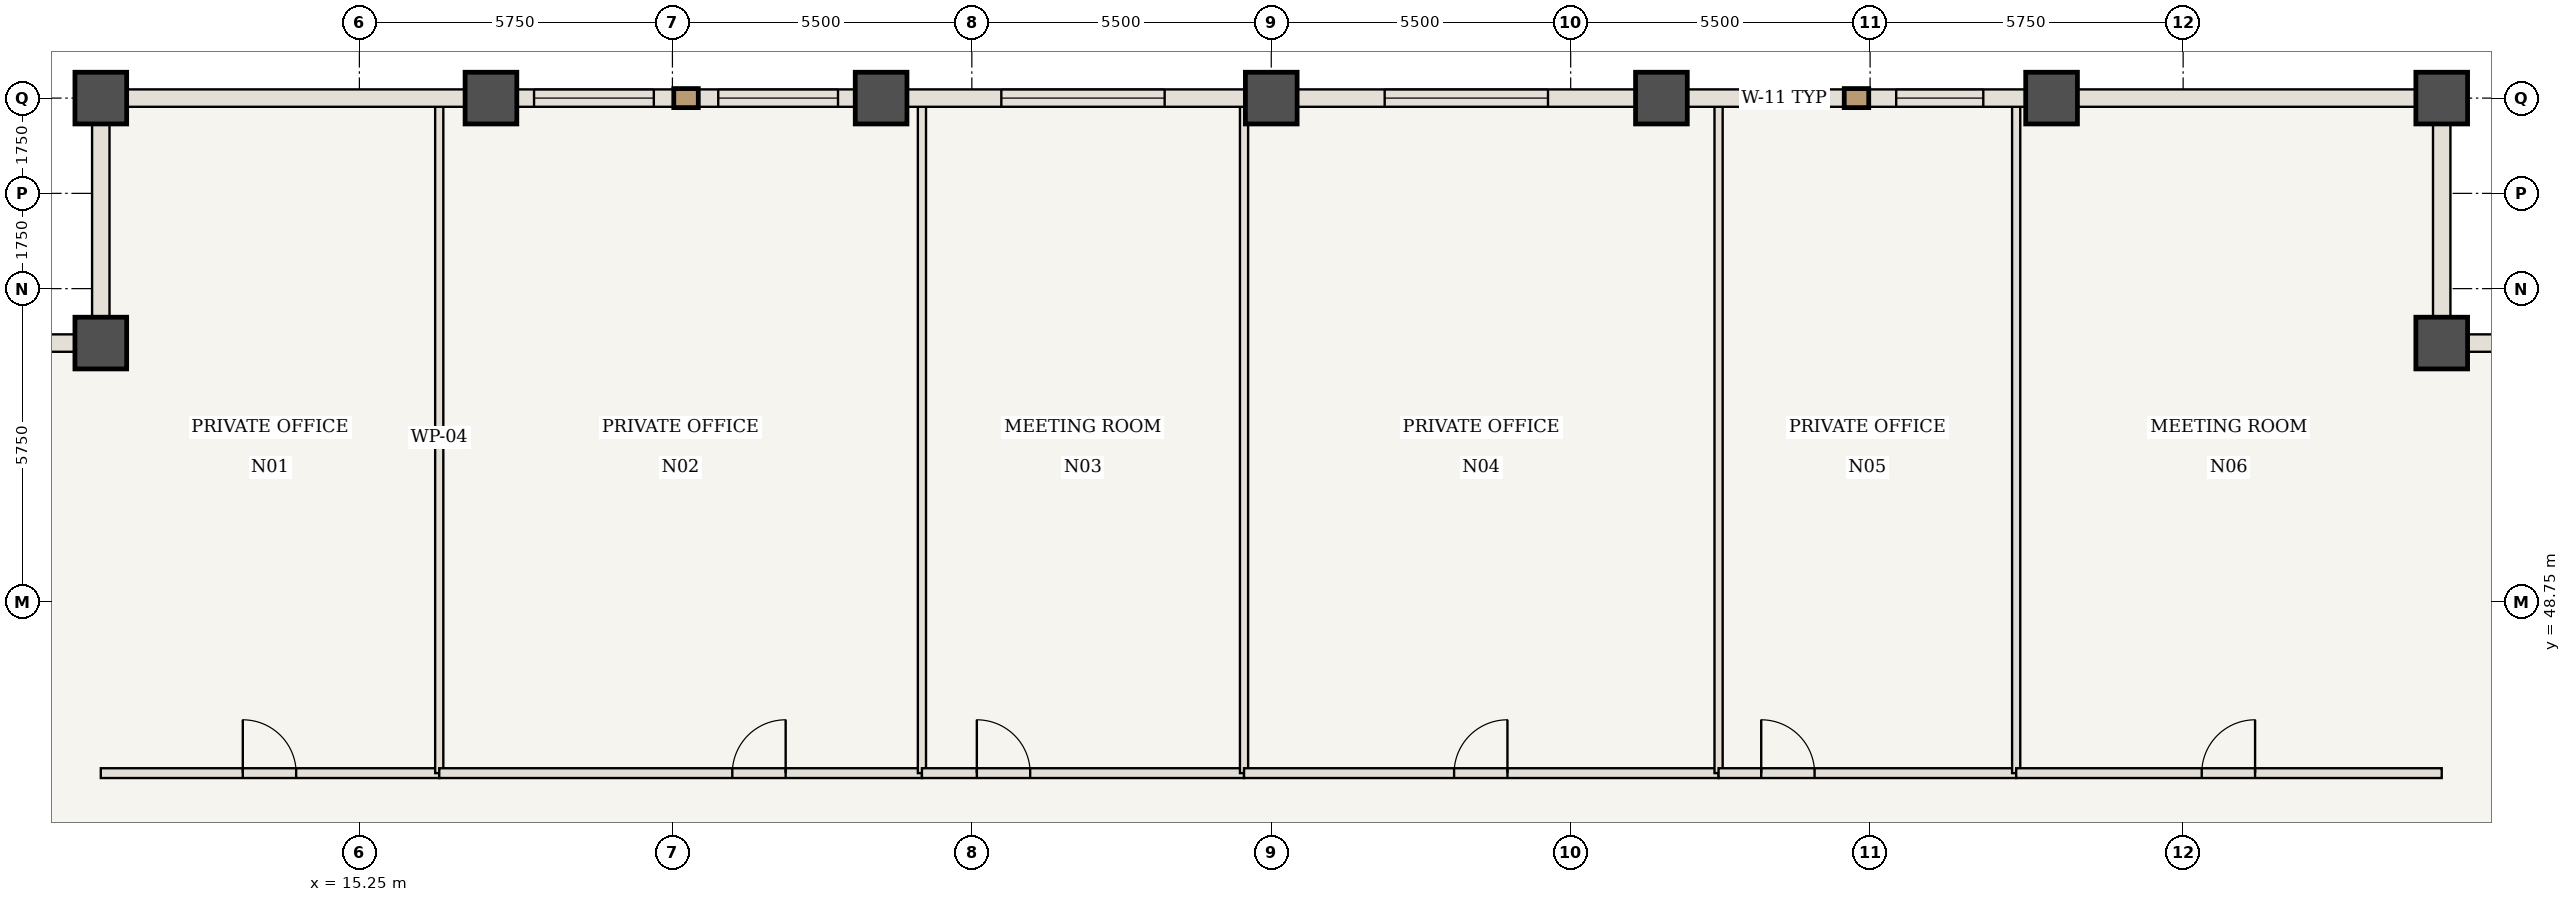
"""IFC4 building model, lengths in metres.
Left out: names, types, materials, properties, quantities, classifications, styles, units other than length and angle.
Written with IfcOpenShell. Run it as: python <this file> out.ifc"""

import sys

from ifc_helpers import new_model, si_unit, direction, frame, frame_2d, origin, origin_2d, place, context, subcontext, project, spatial, rectangle, extrude, element, fill, save


model = new_model("IFC4")
c1 = context("Model", 3, precision=1e-05, world=origin(), true_north=direction((0.0, 1.0)))
c2 = subcontext(c1, "Body", "Model", "MODEL_VIEW")
j1 = project(units=[si_unit("LENGTHUNIT", "METRE"), si_unit("PLANEANGLEUNIT", "RADIAN")], contexts=[c1])
p1 = place(None, origin())
s1 = spatial("IfcSite", under=j1, at=p1, CompositionType="ELEMENT")
p2 = place(p1, origin())
s2 = spatial("IfcBuilding", under=s1, at=p2, CompositionType="ELEMENT")
p3 = place(p2, frame((0.0, 0.0, 110.6)))
s3 = spatial("IfcBuildingStorey", under=s2, at=p3, CompositionType="ELEMENT", Elevation=110.6)
for number, where, z_axis, x_axis in (
    (1, (53.5, 53.5, 0.0), (0.0, 0.0, 1.0), (1.0, 0.0, 0.0)),
    (2, (53.5, 58.0, 0.0), (0.0, 0.0, 1.0), (1.0, 0.0, 0.0)),
    (3, (10.5, 58.0, 0.0), (0.0, 0.0, 1.0), (1.0, 0.0, 0.0)),
    (4, (10.5, 53.5, 0.0), (0.0, 0.0, 1.0), (1.0, 0.0, 0.0)),
    (5, (17.667, 58.0, 0.0), (0.0, 0.0, 1.0), (1.0, 0.0, 0.0)),
    (6, (24.833, 58.0, 0.0), (0.0, 0.0, 1.0), (1.0, 0.0, 0.0)),
    (7, (32.0, 58.0, 0.0), (0.0, 0.0, 1.0), (1.0, 0.0, 0.0)),
    (8, (39.167, 58.0, 0.0), (0.0, 0.0, 1.0), (1.0, 0.0, 0.0)),
    (9, (46.333, 58.0, 0.0), (0.0, 0.0, 1.0), (1.0, 0.0, 0.0)),
):
    element("IfcColumn", number, at=place(p3, frame(where, z_axis=z_axis, x_axis=x_axis)), inside=s3, PredefinedType="COLUMN", context=c2, shape_type="SweptSolid", body=[
        extrude(rectangle(XDim=0.95, YDim=0.95, at=origin_2d()), origin(), (0.0, 0.0, 1.0), 3.85),
    ])
p4 = place(p3, frame((10.5, 45.6, 0.0), z_axis=(0.0, 0.0, 1.0), x_axis=(1.0, 0.0, 0.0)))
e10 = element("IfcWall", 10, at=p4, inside=s3, PredefinedType="STANDARD", context=c2, shape_type="SweptSolid", body=[
    extrude(rectangle(XDim=6.217, YDim=0.18, at=frame_2d((3.108, 0.0))), origin(), (0.0, 0.0, 1.0), 3.43),
])
p5 = place(p4, frame((2.608, 0.0, 0.0)))
e11 = element("IfcOpeningElement", 11, at=p5, cuts=e10, PredefinedType="OPENING", context=c2, shape_type="SweptSolid", body=[
    extrude(rectangle(XDim=0.98, YDim=2.2, at=frame_2d((0.49, 1.1))), frame((0.0, 0.1, 0.0), z_axis=(0.0, -1.0, 0.0), x_axis=(1.0, 0.0, 0.0)), (0.0, 0.0, 1.0), 0.2),
])
p6 = place(p3, frame((16.717, 45.6, 0.0), z_axis=(0.0, 0.0, 1.0), x_axis=(0.0, 1.0, 0.0)))
e12 = element("IfcWall", 12, at=p6, inside=s3, PredefinedType="STANDARD", context=c2, shape_type="SweptSolid", body=[
    extrude(rectangle(XDim=12.34, YDim=0.15, at=frame_2d((6.17, 0.0))), origin(), (0.0, 0.0, 1.0), 3.43),
])
p7 = place(p3, frame((16.717, 45.6, 0.0), z_axis=(0.0, 0.0, 1.0), x_axis=(1.0, 0.0, 0.0)))
e13 = element("IfcWall", 13, at=p7, inside=s3, PredefinedType="STANDARD", context=c2, shape_type="SweptSolid", body=[
    extrude(rectangle(XDim=8.866, YDim=0.18, at=frame_2d((4.433, 0.0))), origin(), (0.0, 0.0, 1.0), 3.43),
])
p8 = place(p7, frame((5.383, 0.0, 0.0)))
e14 = element("IfcOpeningElement", 14, at=p8, cuts=e13, PredefinedType="OPENING", context=c2, shape_type="SweptSolid", body=[
    extrude(rectangle(XDim=0.98, YDim=2.2, at=frame_2d((0.49, 1.1))), frame((0.0, 0.1, 0.0), z_axis=(0.0, -1.0, 0.0), x_axis=(1.0, 0.0, 0.0)), (0.0, 0.0, 1.0), 0.2),
])
p9 = place(p3, frame((25.583, 45.6, 0.0), z_axis=(0.0, 0.0, 1.0), x_axis=(0.0, 1.0, 0.0)))
e15 = element("IfcWall", 15, at=p9, inside=s3, PredefinedType="STANDARD", context=c2, shape_type="SweptSolid", body=[
    extrude(rectangle(XDim=12.34, YDim=0.15, at=frame_2d((6.17, 0.0))), origin(), (0.0, 0.0, 1.0), 3.43),
])
p10 = place(p3, frame((25.583, 45.6, 0.0), z_axis=(0.0, 0.0, 1.0), x_axis=(1.0, 0.0, 0.0)))
e16 = element("IfcWall", 16, at=p10, inside=s3, PredefinedType="STANDARD", context=c2, shape_type="SweptSolid", body=[
    extrude(rectangle(XDim=5.917, YDim=0.18, at=frame_2d((2.958, 0.0))), origin(), (0.0, 0.0, 1.0), 3.43),
])
p11 = place(p10, frame((1.008, 0.0, 0.0)))
e17 = element("IfcOpeningElement", 17, at=p11, cuts=e16, PredefinedType="OPENING", context=c2, shape_type="SweptSolid", body=[
    extrude(rectangle(XDim=0.98, YDim=2.2, at=frame_2d((0.49, 1.1))), frame((0.0, 0.1, 0.0), z_axis=(0.0, -1.0, 0.0), x_axis=(1.0, 0.0, 0.0)), (0.0, 0.0, 1.0), 0.2),
])
p12 = place(p3, frame((31.5, 45.6, 0.0), z_axis=(0.0, 0.0, 1.0), x_axis=(0.0, 1.0, 0.0)))
e18 = element("IfcWall", 18, at=p12, inside=s3, PredefinedType="STANDARD", context=c2, shape_type="SweptSolid", body=[
    extrude(rectangle(XDim=12.34, YDim=0.15, at=frame_2d((6.17, 0.0))), origin(), (0.0, 0.0, 1.0), 3.43),
])
p13 = place(p3, frame((31.5, 45.6, 0.0), z_axis=(0.0, 0.0, 1.0), x_axis=(1.0, 0.0, 0.0)))
e19 = element("IfcWall", 19, at=p13, inside=s3, PredefinedType="STANDARD", context=c2, shape_type="SweptSolid", body=[
    extrude(rectangle(XDim=8.717, YDim=0.18, at=frame_2d((4.358, 0.0))), origin(), (0.0, 0.0, 1.0), 3.43),
])
p14 = place(p13, frame((3.858, 0.0, 0.0)))
e20 = element("IfcOpeningElement", 20, at=p14, cuts=e19, PredefinedType="OPENING", context=c2, shape_type="SweptSolid", body=[
    extrude(rectangle(XDim=0.98, YDim=2.2, at=frame_2d((0.49, 1.1))), frame((0.0, 0.1, 0.0), z_axis=(0.0, -1.0, 0.0), x_axis=(1.0, 0.0, 0.0)), (0.0, 0.0, 1.0), 0.2),
])
p15 = place(p3, frame((40.217, 45.6, 0.0), z_axis=(0.0, 0.0, 1.0), x_axis=(0.0, 1.0, 0.0)))
e21 = element("IfcWall", 21, at=p15, inside=s3, PredefinedType="STANDARD", context=c2, shape_type="SweptSolid", body=[
    extrude(rectangle(XDim=12.34, YDim=0.15, at=frame_2d((6.17, 0.0))), origin(), (0.0, 0.0, 1.0), 3.43),
])
p16 = place(p3, frame((40.217, 45.6, 0.0), z_axis=(0.0, 0.0, 1.0), x_axis=(1.0, 0.0, 0.0)))
e22 = element("IfcWall", 22, at=p16, inside=s3, PredefinedType="STANDARD", context=c2, shape_type="SweptSolid", body=[
    extrude(rectangle(XDim=5.467, YDim=0.18, at=frame_2d((2.733, 0.0))), origin(), (0.0, 0.0, 1.0), 3.43),
])
p17 = place(p16, frame((0.783, 0.0, 0.0)))
e23 = element("IfcOpeningElement", 23, at=p17, cuts=e22, PredefinedType="OPENING", context=c2, shape_type="SweptSolid", body=[
    extrude(rectangle(XDim=0.98, YDim=2.2, at=frame_2d((0.49, 1.1))), frame((0.0, 0.1, 0.0), z_axis=(0.0, -1.0, 0.0), x_axis=(1.0, 0.0, 0.0)), (0.0, 0.0, 1.0), 0.2),
])
p18 = place(p3, frame((45.683, 45.6, 0.0), z_axis=(0.0, 0.0, 1.0), x_axis=(0.0, 1.0, 0.0)))
e24 = element("IfcWall", 24, at=p18, inside=s3, PredefinedType="STANDARD", context=c2, shape_type="SweptSolid", body=[
    extrude(rectangle(XDim=12.34, YDim=0.15, at=frame_2d((6.17, 0.0))), origin(), (0.0, 0.0, 1.0), 3.43),
])
p19 = place(p3, frame((45.683, 45.6, 0.0), z_axis=(0.0, 0.0, 1.0), x_axis=(1.0, 0.0, 0.0)))
e25 = element("IfcWall", 25, at=p19, inside=s3, PredefinedType="STANDARD", context=c2, shape_type="SweptSolid", body=[
    extrude(rectangle(XDim=7.817, YDim=0.18, at=frame_2d((3.908, 0.0))), origin(), (0.0, 0.0, 1.0), 3.43),
])
p20 = place(p19, frame((3.408, 0.0, 0.0)))
e26 = element("IfcOpeningElement", 26, at=p20, cuts=e25, PredefinedType="OPENING", context=c2, shape_type="SweptSolid", body=[
    extrude(rectangle(XDim=0.98, YDim=2.2, at=frame_2d((0.49, 1.1))), frame((0.0, 0.1, 0.0), z_axis=(0.0, -1.0, 0.0), x_axis=(1.0, 0.0, 0.0)), (0.0, 0.0, 1.0), 0.2),
])
p21 = place(p3, frame((10.5, 58.0, 0.0), z_axis=(0.0, 0.0, 1.0), x_axis=(1.0, 0.0, 0.0)))
e27 = element("IfcWall", 27, at=p21, inside=s3, PredefinedType="USERDEFINED", context=c2, shape_type="SweptSolid", body=[
    extrude(rectangle(XDim=7.167, YDim=0.32, at=frame_2d((3.583, 0.0))), origin(), (0.0, 0.0, 1.0), 2.63),
])
p22 = place(p3, frame((17.667, 58.0, 0.0), z_axis=(0.0, 0.0, 1.0), x_axis=(1.0, 0.0, 0.0)))
e28 = element("IfcWall", 28, at=p22, inside=s3, PredefinedType="USERDEFINED", context=c2, shape_type="SweptSolid", body=[
    extrude(rectangle(XDim=7.167, YDim=0.32, at=frame_2d((3.583, 0.0))), origin(), (0.0, 0.0, 1.0), 2.63),
])
p23 = place(p22, frame((0.792, 0.0, 0.85)))
e29 = element("IfcOpeningElement", 29, at=p23, cuts=e28, PredefinedType="OPENING", context=c2, shape_type="SweptSolid", body=[
    extrude(rectangle(XDim=2.2, YDim=1.58, at=frame_2d((1.1, 0.79))), frame((0.0, 0.17, 0.0), z_axis=(0.0, -1.0, 0.0), x_axis=(1.0, 0.0, 0.0)), (0.0, 0.0, 1.0), 0.34),
])
p24 = place(p22, frame((4.175, 0.0, 0.85)))
e30 = element("IfcOpeningElement", 30, at=p24, cuts=e28, PredefinedType="OPENING", context=c2, shape_type="SweptSolid", body=[
    extrude(rectangle(XDim=2.2, YDim=1.58, at=frame_2d((1.1, 0.79))), frame((0.0, 0.17, 0.0), z_axis=(0.0, -1.0, 0.0), x_axis=(1.0, 0.0, 0.0)), (0.0, 0.0, 1.0), 0.34),
])
p25 = place(p3, frame((24.833, 58.0, 0.0), z_axis=(0.0, 0.0, 1.0), x_axis=(1.0, 0.0, 0.0)))
e31 = element("IfcWall", 31, at=p25, inside=s3, PredefinedType="USERDEFINED", context=c2, shape_type="SweptSolid", body=[
    extrude(rectangle(XDim=7.167, YDim=0.32, at=frame_2d((3.583, 0.0))), origin(), (0.0, 0.0, 1.0), 2.63),
])
p26 = place(p25, frame((2.208, 0.0, 0.85)))
e32 = element("IfcOpeningElement", 32, at=p26, cuts=e31, PredefinedType="OPENING", context=c2, shape_type="SweptSolid", body=[
    extrude(rectangle(XDim=3.0, YDim=1.58, at=frame_2d((1.5, 0.79))), frame((0.0, 0.17, 0.0), z_axis=(0.0, -1.0, 0.0), x_axis=(1.0, 0.0, 0.0)), (0.0, 0.0, 1.0), 0.34),
])
p27 = place(p3, frame((32.0, 58.0, 0.0), z_axis=(0.0, 0.0, 1.0), x_axis=(1.0, 0.0, 0.0)))
e33 = element("IfcWall", 33, at=p27, inside=s3, PredefinedType="USERDEFINED", context=c2, shape_type="SweptSolid", body=[
    extrude(rectangle(XDim=7.167, YDim=0.32, at=frame_2d((3.583, 0.0))), origin(), (0.0, 0.0, 1.0), 2.63),
])
p28 = place(p27, frame((2.083, 0.0, 0.85)))
e34 = element("IfcOpeningElement", 34, at=p28, cuts=e33, PredefinedType="OPENING", context=c2, shape_type="SweptSolid", body=[
    extrude(rectangle(XDim=3.0, YDim=1.58, at=frame_2d((1.5, 0.79))), frame((0.0, 0.17, 0.0), z_axis=(0.0, -1.0, 0.0), x_axis=(1.0, 0.0, 0.0)), (0.0, 0.0, 1.0), 0.34),
])
p29 = place(p3, frame((39.167, 58.0, 0.0), z_axis=(0.0, 0.0, 1.0), x_axis=(1.0, 0.0, 0.0)))
e35 = element("IfcWall", 35, at=p29, inside=s3, PredefinedType="USERDEFINED", context=c2, shape_type="SweptSolid", body=[
    extrude(rectangle(XDim=7.167, YDim=0.32, at=frame_2d((3.583, 0.0))), origin(), (0.0, 0.0, 1.0), 2.63),
])
p30 = place(p29, frame((1.454, 0.0, 0.85)))
e36 = element("IfcOpeningElement", 36, at=p30, cuts=e35, PredefinedType="OPENING", context=c2, shape_type="SweptSolid", body=[
    extrude(rectangle(XDim=1.6, YDim=1.58, at=frame_2d((0.8, 0.79))), frame((0.0, 0.17, 0.0), z_axis=(0.0, -1.0, 0.0), x_axis=(1.0, 0.0, 0.0)), (0.0, 0.0, 1.0), 0.34),
])
p31 = place(p29, frame((4.312, 0.0, 0.85)))
e37 = element("IfcOpeningElement", 37, at=p31, cuts=e35, PredefinedType="OPENING", context=c2, shape_type="SweptSolid", body=[
    extrude(rectangle(XDim=1.6, YDim=1.58, at=frame_2d((0.8, 0.79))), frame((0.0, 0.17, 0.0), z_axis=(0.0, -1.0, 0.0), x_axis=(1.0, 0.0, 0.0)), (0.0, 0.0, 1.0), 0.34),
])
p32 = place(p3, frame((46.333, 58.0, 0.0), z_axis=(0.0, 0.0, 1.0), x_axis=(1.0, 0.0, 0.0)))
e38 = element("IfcWall", 38, at=p32, inside=s3, PredefinedType="USERDEFINED", context=c2, shape_type="SweptSolid", body=[
    extrude(rectangle(XDim=7.167, YDim=0.32, at=frame_2d((3.583, 0.0))), origin(), (0.0, 0.0, 1.0), 2.63),
])
for number, where, z_axis, x_axis in (
    (39, (53.5, 53.5, 0.0), (0.0, 0.0, 1.0), (1.0, 0.0, 0.0)),
    (40, (53.5, 58.0, 0.0), (0.0, 0.0, 1.0), (0.0, -1.0, 0.0)),
    (41, (10.5, 53.5, 0.0), (0.0, 0.0, 1.0), (0.0, 1.0, 0.0)),
    (42, (6.0, 53.5, 0.0), (0.0, 0.0, 1.0), (1.0, 0.0, 0.0)),
):
    element("IfcWall", number, at=place(p3, frame(where, z_axis=z_axis, x_axis=x_axis)), inside=s3, PredefinedType="USERDEFINED", context=c2, shape_type="SweptSolid", body=[
        extrude(rectangle(XDim=4.5, YDim=0.32, at=frame_2d((2.25, 0.0))), origin(), (0.0, 0.0, 1.0), 2.63),
    ])
p33 = place(p5, origin())
e43 = element("IfcDoor", 43, at=p33, inside=s3, OperationType="SINGLE_SWING_LEFT", PredefinedType="DOOR", context=c2, shape_type="SweptSolid", body=[
    extrude(rectangle(XDim=0.98, YDim=2.2, at=frame_2d((0.49, 1.1))), frame((0.0, 0.025, 0.0), z_axis=(0.0, -1.0, 0.0), x_axis=(1.0, 0.0, 0.0)), (0.0, 0.0, 1.0), 0.05),
])
fill(e11, e43)
p34 = place(p8, origin())
e44 = element("IfcDoor", 44, at=p34, inside=s3, OperationType="SINGLE_SWING_RIGHT", PredefinedType="DOOR", context=c2, shape_type="SweptSolid", body=[
    extrude(rectangle(XDim=0.98, YDim=2.2, at=frame_2d((0.49, 1.1))), frame((0.0, 0.025, 0.0), z_axis=(0.0, -1.0, 0.0), x_axis=(1.0, 0.0, 0.0)), (0.0, 0.0, 1.0), 0.05),
])
fill(e14, e44)
p35 = place(p11, origin())
e45 = element("IfcDoor", 45, at=p35, inside=s3, OperationType="SINGLE_SWING_LEFT", PredefinedType="DOOR", context=c2, shape_type="SweptSolid", body=[
    extrude(rectangle(XDim=0.98, YDim=2.2, at=frame_2d((0.49, 1.1))), frame((0.0, 0.025, 0.0), z_axis=(0.0, -1.0, 0.0), x_axis=(1.0, 0.0, 0.0)), (0.0, 0.0, 1.0), 0.05),
])
fill(e17, e45)
p36 = place(p14, origin())
e46 = element("IfcDoor", 46, at=p36, inside=s3, OperationType="SINGLE_SWING_RIGHT", PredefinedType="DOOR", context=c2, shape_type="SweptSolid", body=[
    extrude(rectangle(XDim=0.98, YDim=2.2, at=frame_2d((0.49, 1.1))), frame((0.0, 0.025, 0.0), z_axis=(0.0, -1.0, 0.0), x_axis=(1.0, 0.0, 0.0)), (0.0, 0.0, 1.0), 0.05),
])
fill(e20, e46)
p37 = place(p17, origin())
e47 = element("IfcDoor", 47, at=p37, inside=s3, OperationType="SINGLE_SWING_LEFT", PredefinedType="DOOR", context=c2, shape_type="SweptSolid", body=[
    extrude(rectangle(XDim=0.98, YDim=2.2, at=frame_2d((0.49, 1.1))), frame((0.0, 0.025, 0.0), z_axis=(0.0, -1.0, 0.0), x_axis=(1.0, 0.0, 0.0)), (0.0, 0.0, 1.0), 0.05),
])
fill(e23, e47)
p38 = place(p20, origin())
e48 = element("IfcDoor", 48, at=p38, inside=s3, OperationType="SINGLE_SWING_RIGHT", PredefinedType="DOOR", context=c2, shape_type="SweptSolid", body=[
    extrude(rectangle(XDim=0.98, YDim=2.2, at=frame_2d((0.49, 1.1))), frame((0.0, 0.025, 0.0), z_axis=(0.0, -1.0, 0.0), x_axis=(1.0, 0.0, 0.0)), (0.0, 0.0, 1.0), 0.05),
])
fill(e26, e48)
p39 = place(p23, origin())
e49 = element("IfcWindow", 49, at=p39, inside=s3, PartitioningType="SINGLE_PANEL", PredefinedType="WINDOW", context=c2, shape_type="SweptSolid", body=[
    extrude(rectangle(XDim=2.2, YDim=1.58, at=frame_2d((1.1, 0.79))), frame((0.0, 0.03, 0.0), z_axis=(0.0, -1.0, 0.0), x_axis=(1.0, 0.0, 0.0)), (0.0, 0.0, 1.0), 0.06),
])
fill(e29, e49)
p40 = place(p24, origin())
e50 = element("IfcWindow", 50, at=p40, inside=s3, PartitioningType="SINGLE_PANEL", PredefinedType="WINDOW", context=c2, shape_type="SweptSolid", body=[
    extrude(rectangle(XDim=2.2, YDim=1.58, at=frame_2d((1.1, 0.79))), frame((0.0, 0.03, 0.0), z_axis=(0.0, -1.0, 0.0), x_axis=(1.0, 0.0, 0.0)), (0.0, 0.0, 1.0), 0.06),
])
fill(e30, e50)
p41 = place(p26, origin())
e51 = element("IfcWindow", 51, at=p41, inside=s3, PartitioningType="SINGLE_PANEL", PredefinedType="WINDOW", context=c2, shape_type="SweptSolid", body=[
    extrude(rectangle(XDim=3.0, YDim=1.58, at=frame_2d((1.5, 0.79))), frame((0.0, 0.03, 0.0), z_axis=(0.0, -1.0, 0.0), x_axis=(1.0, 0.0, 0.0)), (0.0, 0.0, 1.0), 0.06),
])
fill(e32, e51)
p42 = place(p28, origin())
e52 = element("IfcWindow", 52, at=p42, inside=s3, PartitioningType="SINGLE_PANEL", PredefinedType="WINDOW", context=c2, shape_type="SweptSolid", body=[
    extrude(rectangle(XDim=3.0, YDim=1.58, at=frame_2d((1.5, 0.79))), frame((0.0, 0.03, 0.0), z_axis=(0.0, -1.0, 0.0), x_axis=(1.0, 0.0, 0.0)), (0.0, 0.0, 1.0), 0.06),
])
fill(e34, e52)
p43 = place(p30, origin())
e53 = element("IfcWindow", 53, at=p43, inside=s3, PartitioningType="SINGLE_PANEL", PredefinedType="WINDOW", context=c2, shape_type="SweptSolid", body=[
    extrude(rectangle(XDim=1.6, YDim=1.58, at=frame_2d((0.8, 0.79))), frame((0.0, 0.03, 0.0), z_axis=(0.0, -1.0, 0.0), x_axis=(1.0, 0.0, 0.0)), (0.0, 0.0, 1.0), 0.06),
])
fill(e36, e53)
p44 = place(p31, origin())
e54 = element("IfcWindow", 54, at=p44, inside=s3, PartitioningType="SINGLE_PANEL", PredefinedType="WINDOW", context=c2, shape_type="SweptSolid", body=[
    extrude(rectangle(XDim=1.6, YDim=1.58, at=frame_2d((0.8, 0.79))), frame((0.0, 0.03, 0.0), z_axis=(0.0, -1.0, 0.0), x_axis=(1.0, 0.0, 0.0)), (0.0, 0.0, 1.0), 0.06),
])
fill(e37, e54)
save(model, sys.argv[1])
